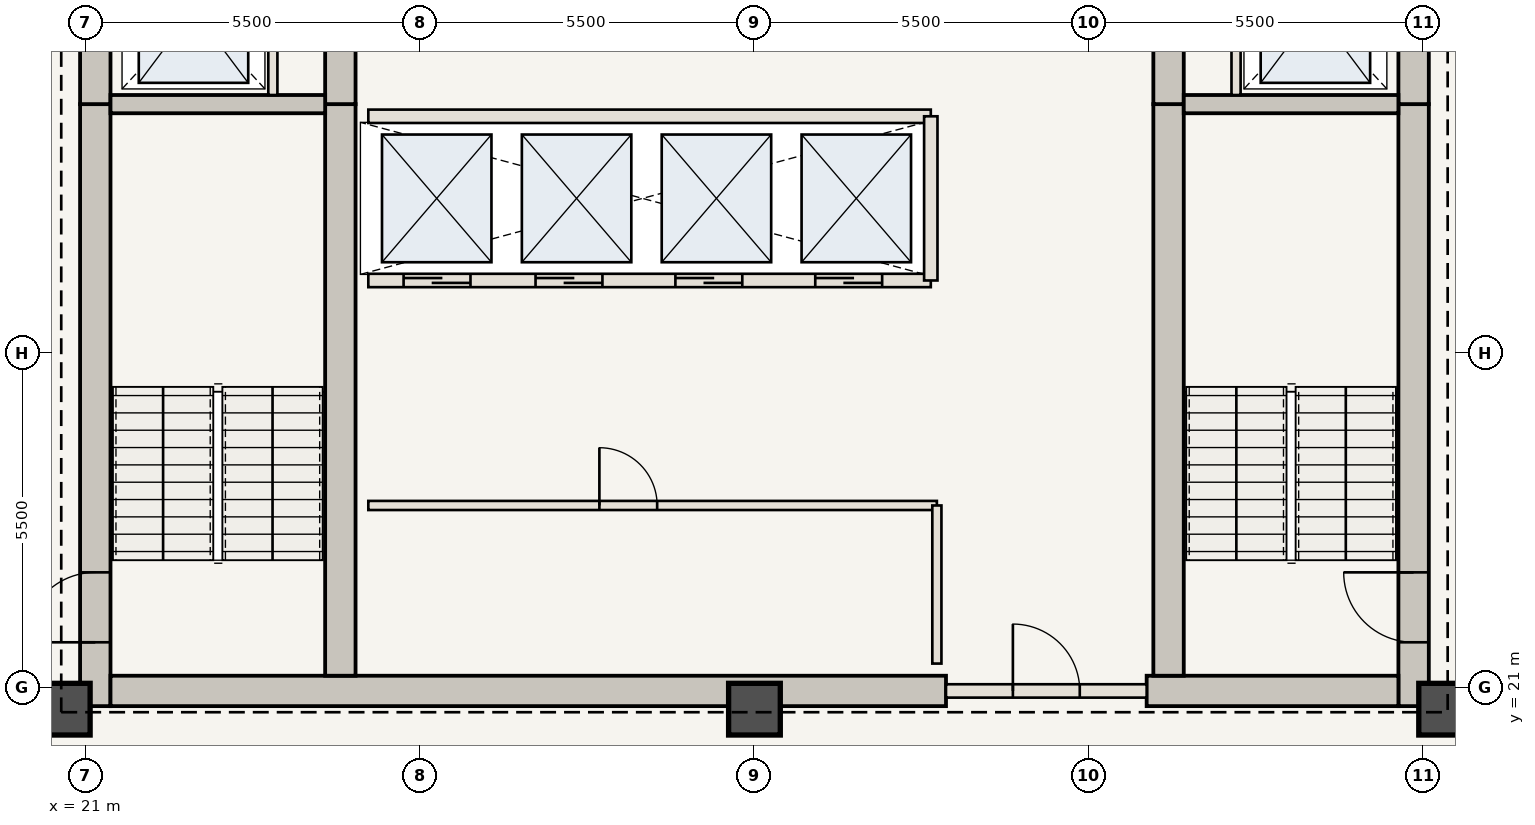
"""IFC4 building model, lengths in metres.
Left out: names, types, materials, properties, quantities, classifications, styles, units other than length and angle.
Written with IfcOpenShell. Run it as: python <this file> out.ifc"""

import sys

from ifc_helpers import new_model, si_unit, direction, frame, frame_2d, origin, origin_2d, place, context, subcontext, project, spatial, rectangle, extrude, element, fill, save


model = new_model("IFC4")
c1 = context("Model", 3, precision=1e-05, world=origin(), true_north=direction((0.0, 1.0)))
c2 = subcontext(c1, "Body", "Model", "MODEL_VIEW")
j1 = project(units=[si_unit("LENGTHUNIT", "METRE"), si_unit("PLANEANGLEUNIT", "RADIAN")], contexts=[c1])
p1 = place(None, origin())
s1 = spatial("IfcSite", under=j1, at=p1, CompositionType="ELEMENT")
p2 = place(p1, origin())
s2 = spatial("IfcBuilding", under=s1, at=p2, CompositionType="ELEMENT")
p3 = place(p2, frame((0.0, 0.0, 229.25)))
s3 = spatial("IfcBuildingStorey", under=s2, at=p3, CompositionType="ELEMENT", Elevation=229.25)
p4 = place(p3, frame((21.16, 20.7, 0.0), z_axis=(0.0, 0.0, 1.0), x_axis=(0.0, 1.0, 0.0)))
e1 = element("IfcWall", 1, at=p4, inside=s3, PredefinedType="SHEAR", context=c2, shape_type="SweptSolid", body=[
    extrude(rectangle(XDim=9.9, YDim=0.5, at=frame_2d((4.95, 0.0))), origin(), (0.0, 0.0, 1.0), 3.85),
])
p5 = place(p4, frame((1.05, 0.0, 0.0)))
e2 = element("IfcOpeningElement", 2, at=p5, cuts=e1, PredefinedType="OPENING", context=c2, shape_type="SweptSolid", body=[
    extrude(rectangle(XDim=1.15, YDim=2.15, at=frame_2d((0.575, 1.075))), frame((0.0, 0.26, 0.0), z_axis=(0.0, -1.0, 0.0), x_axis=(1.0, 0.0, 0.0)), (0.0, 0.0, 1.0), 0.52),
])
p6 = place(p3, frame((21.16, 30.6, 0.0), z_axis=(0.0, 0.0, 1.0), x_axis=(0.0, 1.0, 0.0)))
e3 = element("IfcWall", 3, at=p6, inside=s3, PredefinedType="SHEAR", context=c2, shape_type="SweptSolid", body=[
    extrude(rectangle(XDim=12.65, YDim=0.5, at=frame_2d((6.325, 0.0))), origin(), (0.0, 0.0, 1.0), 3.85),
])
p7 = place(p6, frame((4.2, 0.0, 0.0)))
e4 = element("IfcOpeningElement", 4, at=p7, cuts=e3, PredefinedType="OPENING", context=c2, shape_type="SweptSolid", body=[
    extrude(rectangle(XDim=1.1, YDim=2.15, at=frame_2d((0.55, 1.075))), frame((0.0, 0.26, 0.0), z_axis=(0.0, -1.0, 0.0), x_axis=(1.0, 0.0, 0.0)), (0.0, 0.0, 1.0), 0.52),
])
p8 = place(p6, frame((9.2, 0.0, 0.0)))
e5 = element("IfcOpeningElement", 5, at=p8, cuts=e3, PredefinedType="OPENING", context=c2, shape_type="SweptSolid", body=[
    extrude(rectangle(XDim=0.92, YDim=2.1, at=frame_2d((0.46, 1.05))), frame((0.0, 0.26, 0.0), z_axis=(0.0, -1.0, 0.0), x_axis=(1.0, 0.0, 0.0)), (0.0, 0.0, 1.0), 0.52),
])
p9 = place(p3, frame((42.84, 20.7, 0.0), z_axis=(0.0, 0.0, 1.0), x_axis=(0.0, 1.0, 0.0)))
e6 = element("IfcWall", 6, at=p9, inside=s3, PredefinedType="SHEAR", context=c2, shape_type="SweptSolid", body=[
    extrude(rectangle(XDim=9.9, YDim=0.5, at=frame_2d((4.95, 0.0))), origin(), (0.0, 0.0, 1.0), 3.85),
])
p10 = place(p9, frame((1.05, 0.0, 0.0)))
e7 = element("IfcOpeningElement", 7, at=p10, cuts=e6, PredefinedType="OPENING", context=c2, shape_type="SweptSolid", body=[
    extrude(rectangle(XDim=1.15, YDim=2.15, at=frame_2d((0.575, 1.075))), frame((0.0, 0.26, 0.0), z_axis=(0.0, -1.0, 0.0), x_axis=(1.0, 0.0, 0.0)), (0.0, 0.0, 1.0), 0.52),
])
p11 = place(p3, frame((42.84, 30.6, 0.0), z_axis=(0.0, 0.0, 1.0), x_axis=(0.0, 1.0, 0.0)))
e8 = element("IfcWall", 8, at=p11, inside=s3, PredefinedType="SHEAR", context=c2, shape_type="SweptSolid", body=[
    extrude(rectangle(XDim=12.65, YDim=0.5, at=frame_2d((6.325, 0.0))), origin(), (0.0, 0.0, 1.0), 3.85),
])
p12 = place(p11, frame((4.2, 0.0, 0.0)))
e9 = element("IfcOpeningElement", 9, at=p12, cuts=e8, PredefinedType="OPENING", context=c2, shape_type="SweptSolid", body=[
    extrude(rectangle(XDim=1.1, YDim=2.15, at=frame_2d((0.55, 1.075))), frame((0.0, 0.26, 0.0), z_axis=(0.0, -1.0, 0.0), x_axis=(1.0, 0.0, 0.0)), (0.0, 0.0, 1.0), 0.52),
])
p13 = place(p11, frame((8.05, 0.0, 0.0)))
e10 = element("IfcOpeningElement", 10, at=p13, cuts=e8, PredefinedType="OPENING", context=c2, shape_type="SweptSolid", body=[
    extrude(rectangle(XDim=0.88, YDim=2.1, at=frame_2d((0.44, 1.05))), frame((0.0, 0.26, 0.0), z_axis=(0.0, -1.0, 0.0), x_axis=(1.0, 0.0, 0.0)), (0.0, 0.0, 1.0), 0.52),
])
p14 = place(p11, frame((9.45, 0.0, 0.0)))
e11 = element("IfcOpeningElement", 11, at=p14, cuts=e8, PredefinedType="OPENING", context=c2, shape_type="SweptSolid", body=[
    extrude(rectangle(XDim=0.88, YDim=2.1, at=frame_2d((0.44, 1.05))), frame((0.0, 0.26, 0.0), z_axis=(0.0, -1.0, 0.0), x_axis=(1.0, 0.0, 0.0)), (0.0, 0.0, 1.0), 0.52),
])
p15 = place(p11, frame((10.85, 0.0, 0.0)))
e12 = element("IfcOpeningElement", 12, at=p15, cuts=e8, PredefinedType="OPENING", context=c2, shape_type="SweptSolid", body=[
    extrude(rectangle(XDim=0.88, YDim=2.1, at=frame_2d((0.44, 1.05))), frame((0.0, 0.26, 0.0), z_axis=(0.0, -1.0, 0.0), x_axis=(1.0, 0.0, 0.0)), (0.0, 0.0, 1.0), 0.52),
])
p16 = place(p3, frame((21.41, 20.95, 0.0), z_axis=(0.0, 0.0, 1.0), x_axis=(1.0, 0.0, 0.0)))
e13 = element("IfcWall", 13, at=p16, inside=s3, PredefinedType="SHEAR", context=c2, shape_type="SweptSolid", body=[
    extrude(rectangle(XDim=13.74, YDim=0.5, at=frame_2d((6.87, 0.0))), origin(), (0.0, 0.0, 1.0), 3.85),
])
p17 = place(p3, frame((38.45, 20.95, 0.0), z_axis=(0.0, 0.0, 1.0), x_axis=(1.0, 0.0, 0.0)))
e14 = element("IfcWall", 14, at=p17, inside=s3, PredefinedType="SHEAR", context=c2, shape_type="SweptSolid", body=[
    extrude(rectangle(XDim=4.14, YDim=0.5, at=frame_2d((2.07, 0.0))), origin(), (0.0, 0.0, 1.0), 3.85),
])
p18 = place(p3, frame((25.19, 21.2, 0.0), z_axis=(0.0, 0.0, 1.0), x_axis=(0.0, 1.0, 0.0)))
e15 = element("IfcWall", 15, at=p18, inside=s3, PredefinedType="SHEAR", context=c2, shape_type="SweptSolid", body=[
    extrude(rectangle(XDim=9.4, YDim=0.5, at=frame_2d((4.7, 0.0))), origin(), (0.0, 0.0, 1.0), 3.85),
])
p19 = place(p3, frame((25.19, 30.6, 0.0), z_axis=(0.0, 0.0, 1.0), x_axis=(0.0, 1.0, 0.0)))
e16 = element("IfcWall", 16, at=p19, inside=s3, PredefinedType="SHEAR", context=c2, shape_type="SweptSolid", body=[
    extrude(rectangle(XDim=12.15, YDim=0.5, at=frame_2d((6.075, 0.0))), origin(), (0.0, 0.0, 1.0), 3.85),
])
p20 = place(p19, frame((6.25, 0.0, 0.0)))
e17 = element("IfcOpeningElement", 17, at=p20, cuts=e16, PredefinedType="OPENING", context=c2, shape_type="SweptSolid", body=[
    extrude(rectangle(XDim=1.1, YDim=2.15, at=frame_2d((0.55, 1.075))), frame((0.0, 0.26, 0.0), z_axis=(0.0, -1.0, 0.0), x_axis=(1.0, 0.0, 0.0)), (0.0, 0.0, 1.0), 0.52),
])
p21 = place(p3, frame((38.81, 21.2, 0.0), z_axis=(0.0, 0.0, 1.0), x_axis=(0.0, 1.0, 0.0)))
e18 = element("IfcWall", 18, at=p21, inside=s3, PredefinedType="SHEAR", context=c2, shape_type="SweptSolid", body=[
    extrude(rectangle(XDim=9.4, YDim=0.5, at=frame_2d((4.7, 0.0))), origin(), (0.0, 0.0, 1.0), 3.85),
])
p22 = place(p3, frame((38.81, 30.6, 0.0), z_axis=(0.0, 0.0, 1.0), x_axis=(0.0, 1.0, 0.0)))
e19 = element("IfcWall", 19, at=p22, inside=s3, PredefinedType="SHEAR", context=c2, shape_type="SweptSolid", body=[
    extrude(rectangle(XDim=12.15, YDim=0.5, at=frame_2d((6.075, 0.0))), origin(), (0.0, 0.0, 1.0), 3.85),
])
for number, where, z_axis, x_axis in (
    (20, (20.65, 20.65, 0.0), (0.0, 0.0, 1.0), (1.0, 0.0, 0.0)),
    (21, (32.0, 20.65, 0.0), (0.0, 0.0, 1.0), (1.0, 0.0, 0.0)),
    (22, (43.35, 20.65, 0.0), (0.0, 0.0, 1.0), (1.0, 0.0, 0.0)),
):
    element("IfcColumn", number, at=place(p3, frame(where, z_axis=z_axis, x_axis=x_axis)), inside=s3, PredefinedType="COLUMN", context=c2, shape_type="SweptSolid", body=[
        extrude(rectangle(XDim=0.85, YDim=0.85, at=origin_2d()), origin(), (0.0, 0.0, 1.0), 3.85),
    ])
for number, where, z_axis, x_axis in (
    (23, (21.41, 30.6, 0.0), (0.0, 0.0, 1.0), (1.0, 0.0, 0.0)),
    (24, (39.06, 30.6, 0.0), (0.0, 0.0, 1.0), (1.0, 0.0, 0.0)),
):
    element("IfcWall", number, at=place(p3, frame(where, z_axis=z_axis, x_axis=x_axis)), inside=s3, PredefinedType="SHEAR", context=c2, shape_type="SweptSolid", body=[
        extrude(rectangle(XDim=3.53, YDim=0.3, at=frame_2d((1.765, 0.0))), origin(), (0.0, 0.0, 1.0), 3.685),
    ])
for number, where, z_axis, x_axis in (
    (25, (24.08, 30.75, 0.0), (0.0, 0.0, 1.0), (0.0, 1.0, 0.0)),
    (26, (39.92, 30.75, 0.0), (0.0, 0.0, 1.0), (0.0, 1.0, 0.0)),
):
    element("IfcWall", number, at=place(p3, frame(where, z_axis=z_axis, x_axis=x_axis)), inside=s3, PredefinedType="STANDARD", context=c2, shape_type="SweptSolid", body=[
        extrude(rectangle(XDim=2.65, YDim=0.15, at=frame_2d((1.325, 0.0))), origin(), (0.0, 0.0, 1.0), 3.685),
    ])
p23 = place(p3, frame((35.15, 20.95, 0.0), z_axis=(0.0, 0.0, 1.0), x_axis=(1.0, 0.0, 0.0)))
e27 = element("IfcWall", 27, at=p23, inside=s3, PredefinedType="STANDARD", context=c2, shape_type="SweptSolid", body=[
    extrude(rectangle(XDim=3.3, YDim=0.22, at=frame_2d((1.65, 0.0))), origin(), (0.0, 0.0, 1.0), 3.685),
])
p24 = place(p23, frame((1.1, 0.0, 0.0)))
e28 = element("IfcOpeningElement", 28, at=p24, cuts=e27, PredefinedType="OPENING", context=c2, shape_type="SweptSolid", body=[
    extrude(rectangle(XDim=1.1, YDim=2.15, at=frame_2d((0.55, 1.075))), frame((0.0, 0.12, 0.0), z_axis=(0.0, -1.0, 0.0), x_axis=(1.0, 0.0, 0.0)), (0.0, 0.0, 1.0), 0.24),
])
p25 = place(p3, frame((25.65, 24.0, 0.0), z_axis=(0.0, 0.0, 1.0), x_axis=(1.0, 0.0, 0.0)))
e29 = element("IfcWall", 29, at=p25, inside=s3, PredefinedType="STANDARD", context=c2, shape_type="SweptSolid", body=[
    extrude(rectangle(XDim=9.35, YDim=0.15, at=frame_2d((4.675, 0.0))), origin(), (0.0, 0.0, 1.0), 3.685),
])
p26 = place(p25, frame((3.8, 0.0, 0.0)))
e30 = element("IfcOpeningElement", 30, at=p26, cuts=e29, PredefinedType="OPENING", context=c2, shape_type="SweptSolid", body=[
    extrude(rectangle(XDim=0.95, YDim=2.15, at=frame_2d((0.475, 1.075))), frame((0.0, 0.085, 0.0), z_axis=(0.0, -1.0, 0.0), x_axis=(1.0, 0.0, 0.0)), (0.0, 0.0, 1.0), 0.17),
])
p27 = place(p3, frame((35.0, 21.4, 0.0), z_axis=(0.0, 0.0, 1.0), x_axis=(0.0, 1.0, 0.0)))
e31 = element("IfcWall", 31, at=p27, inside=s3, PredefinedType="STANDARD", context=c2, shape_type="SweptSolid", body=[
    extrude(rectangle(XDim=2.6, YDim=0.15, at=frame_2d((1.3, 0.0))), origin(), (0.0, 0.0, 1.0), 3.685),
])
p28 = place(p3, frame((25.65, 27.7, 0.0), z_axis=(0.0, 0.0, 1.0), x_axis=(1.0, 0.0, 0.0)))
e32 = element("IfcWall", 32, at=p28, inside=s3, PredefinedType="STANDARD", context=c2, shape_type="SweptSolid", body=[
    extrude(rectangle(XDim=9.25, YDim=0.22, at=frame_2d((4.625, 0.0))), origin(), (0.0, 0.0, 1.0), 3.685),
])
p29 = place(p28, frame((0.58, 0.0, 0.0)))
e33 = element("IfcOpeningElement", 33, at=p29, cuts=e32, PredefinedType="OPENING", context=c2, shape_type="SweptSolid", body=[
    extrude(rectangle(XDim=1.1, YDim=2.15, at=frame_2d((0.55, 1.075))), frame((0.0, 0.12, 0.0), z_axis=(0.0, -1.0, 0.0), x_axis=(1.0, 0.0, 0.0)), (0.0, 0.0, 1.0), 0.24),
])
p30 = place(p28, frame((2.75, 0.0, 0.0)))
e34 = element("IfcOpeningElement", 34, at=p30, cuts=e32, PredefinedType="OPENING", context=c2, shape_type="SweptSolid", body=[
    extrude(rectangle(XDim=1.1, YDim=2.15, at=frame_2d((0.55, 1.075))), frame((0.0, 0.12, 0.0), z_axis=(0.0, -1.0, 0.0), x_axis=(1.0, 0.0, 0.0)), (0.0, 0.0, 1.0), 0.24),
])
p31 = place(p28, frame((5.05, 0.0, 0.0)))
e35 = element("IfcOpeningElement", 35, at=p31, cuts=e32, PredefinedType="OPENING", context=c2, shape_type="SweptSolid", body=[
    extrude(rectangle(XDim=1.1, YDim=2.15, at=frame_2d((0.55, 1.075))), frame((0.0, 0.12, 0.0), z_axis=(0.0, -1.0, 0.0), x_axis=(1.0, 0.0, 0.0)), (0.0, 0.0, 1.0), 0.24),
])
p32 = place(p28, frame((7.35, 0.0, 0.0)))
e36 = element("IfcOpeningElement", 36, at=p32, cuts=e32, PredefinedType="OPENING", context=c2, shape_type="SweptSolid", body=[
    extrude(rectangle(XDim=1.1, YDim=2.15, at=frame_2d((0.55, 1.075))), frame((0.0, 0.12, 0.0), z_axis=(0.0, -1.0, 0.0), x_axis=(1.0, 0.0, 0.0)), (0.0, 0.0, 1.0), 0.24),
])
p33 = place(p3, frame((25.65, 30.4, 0.0), z_axis=(0.0, 0.0, 1.0), x_axis=(1.0, 0.0, 0.0)))
e37 = element("IfcWall", 37, at=p33, inside=s3, PredefinedType="STANDARD", context=c2, shape_type="SweptSolid", body=[
    extrude(rectangle(XDim=9.25, YDim=0.22, at=frame_2d((4.625, 0.0))), origin(), (0.0, 0.0, 1.0), 3.685),
])
p34 = place(p3, frame((34.9, 27.7, 0.0), z_axis=(0.0, 0.0, 1.0), x_axis=(0.0, 1.0, 0.0)))
e38 = element("IfcWall", 38, at=p34, inside=s3, PredefinedType="STANDARD", context=c2, shape_type="SweptSolid", body=[
    extrude(rectangle(XDim=2.7, YDim=0.22, at=frame_2d((1.35, 0.0))), origin(), (0.0, 0.0, 1.0), 3.685),
])
p35 = place(p5, origin())
e39 = element("IfcDoor", 39, at=p35, inside=s3, OperationType="SINGLE_SWING_LEFT", PredefinedType="DOOR", context=c2, shape_type="SweptSolid", body=[
    extrude(rectangle(XDim=1.15, YDim=2.15, at=frame_2d((0.575, 1.075))), frame((0.0, 0.025, 0.0), z_axis=(0.0, -1.0, 0.0), x_axis=(1.0, 0.0, 0.0)), (0.0, 0.0, 1.0), 0.05),
])
fill(e2, e39)
p36 = place(p10, origin())
e40 = element("IfcDoor", 40, at=p36, inside=s3, OperationType="SINGLE_SWING_RIGHT", PredefinedType="DOOR", context=c2, shape_type="SweptSolid", body=[
    extrude(rectangle(XDim=1.15, YDim=2.15, at=frame_2d((0.575, 1.075))), frame((0.0, 0.025, 0.0), z_axis=(0.0, -1.0, 0.0), x_axis=(1.0, 0.0, 0.0)), (0.0, 0.0, 1.0), 0.05),
])
fill(e7, e40)
p37 = place(p24, origin())
e41 = element("IfcDoor", 41, at=p37, inside=s3, OperationType="SINGLE_SWING_LEFT", PredefinedType="DOOR", context=c2, shape_type="SweptSolid", body=[
    extrude(rectangle(XDim=1.1, YDim=2.15, at=frame_2d((0.55, 1.075))), frame((0.0, 0.025, 0.0), z_axis=(0.0, -1.0, 0.0), x_axis=(1.0, 0.0, 0.0)), (0.0, 0.0, 1.0), 0.05),
])
fill(e28, e41)
p38 = place(p26, origin())
e42 = element("IfcDoor", 42, at=p38, inside=s3, OperationType="SINGLE_SWING_LEFT", PredefinedType="DOOR", context=c2, shape_type="SweptSolid", body=[
    extrude(rectangle(XDim=0.95, YDim=2.15, at=frame_2d((0.475, 1.075))), frame((0.0, 0.025, 0.0), z_axis=(0.0, -1.0, 0.0), x_axis=(1.0, 0.0, 0.0)), (0.0, 0.0, 1.0), 0.05),
])
fill(e30, e42)
p39 = place(p29, origin())
e43 = element("IfcDoor", 43, at=p39, inside=s3, OperationType="DOUBLE_DOOR_SLIDING", PredefinedType="DOOR", context=c2, shape_type="SweptSolid", body=[
    extrude(rectangle(XDim=1.1, YDim=2.15, at=frame_2d((0.55, 1.075))), frame((0.0, 0.025, 0.0), z_axis=(0.0, -1.0, 0.0), x_axis=(1.0, 0.0, 0.0)), (0.0, 0.0, 1.0), 0.05),
])
fill(e33, e43)
p40 = place(p30, origin())
e44 = element("IfcDoor", 44, at=p40, inside=s3, OperationType="DOUBLE_DOOR_SLIDING", PredefinedType="DOOR", context=c2, shape_type="SweptSolid", body=[
    extrude(rectangle(XDim=1.1, YDim=2.15, at=frame_2d((0.55, 1.075))), frame((0.0, 0.025, 0.0), z_axis=(0.0, -1.0, 0.0), x_axis=(1.0, 0.0, 0.0)), (0.0, 0.0, 1.0), 0.05),
])
fill(e34, e44)
p41 = place(p31, origin())
e45 = element("IfcDoor", 45, at=p41, inside=s3, OperationType="DOUBLE_DOOR_SLIDING", PredefinedType="DOOR", context=c2, shape_type="SweptSolid", body=[
    extrude(rectangle(XDim=1.1, YDim=2.15, at=frame_2d((0.55, 1.075))), frame((0.0, 0.025, 0.0), z_axis=(0.0, -1.0, 0.0), x_axis=(1.0, 0.0, 0.0)), (0.0, 0.0, 1.0), 0.05),
])
fill(e35, e45)
p42 = place(p32, origin())
e46 = element("IfcDoor", 46, at=p42, inside=s3, OperationType="DOUBLE_DOOR_SLIDING", PredefinedType="DOOR", context=c2, shape_type="SweptSolid", body=[
    extrude(rectangle(XDim=1.1, YDim=2.15, at=frame_2d((0.55, 1.075))), frame((0.0, 0.025, 0.0), z_axis=(0.0, -1.0, 0.0), x_axis=(1.0, 0.0, 0.0)), (0.0, 0.0, 1.0), 0.05),
])
fill(e36, e46)
save(model, sys.argv[1])
